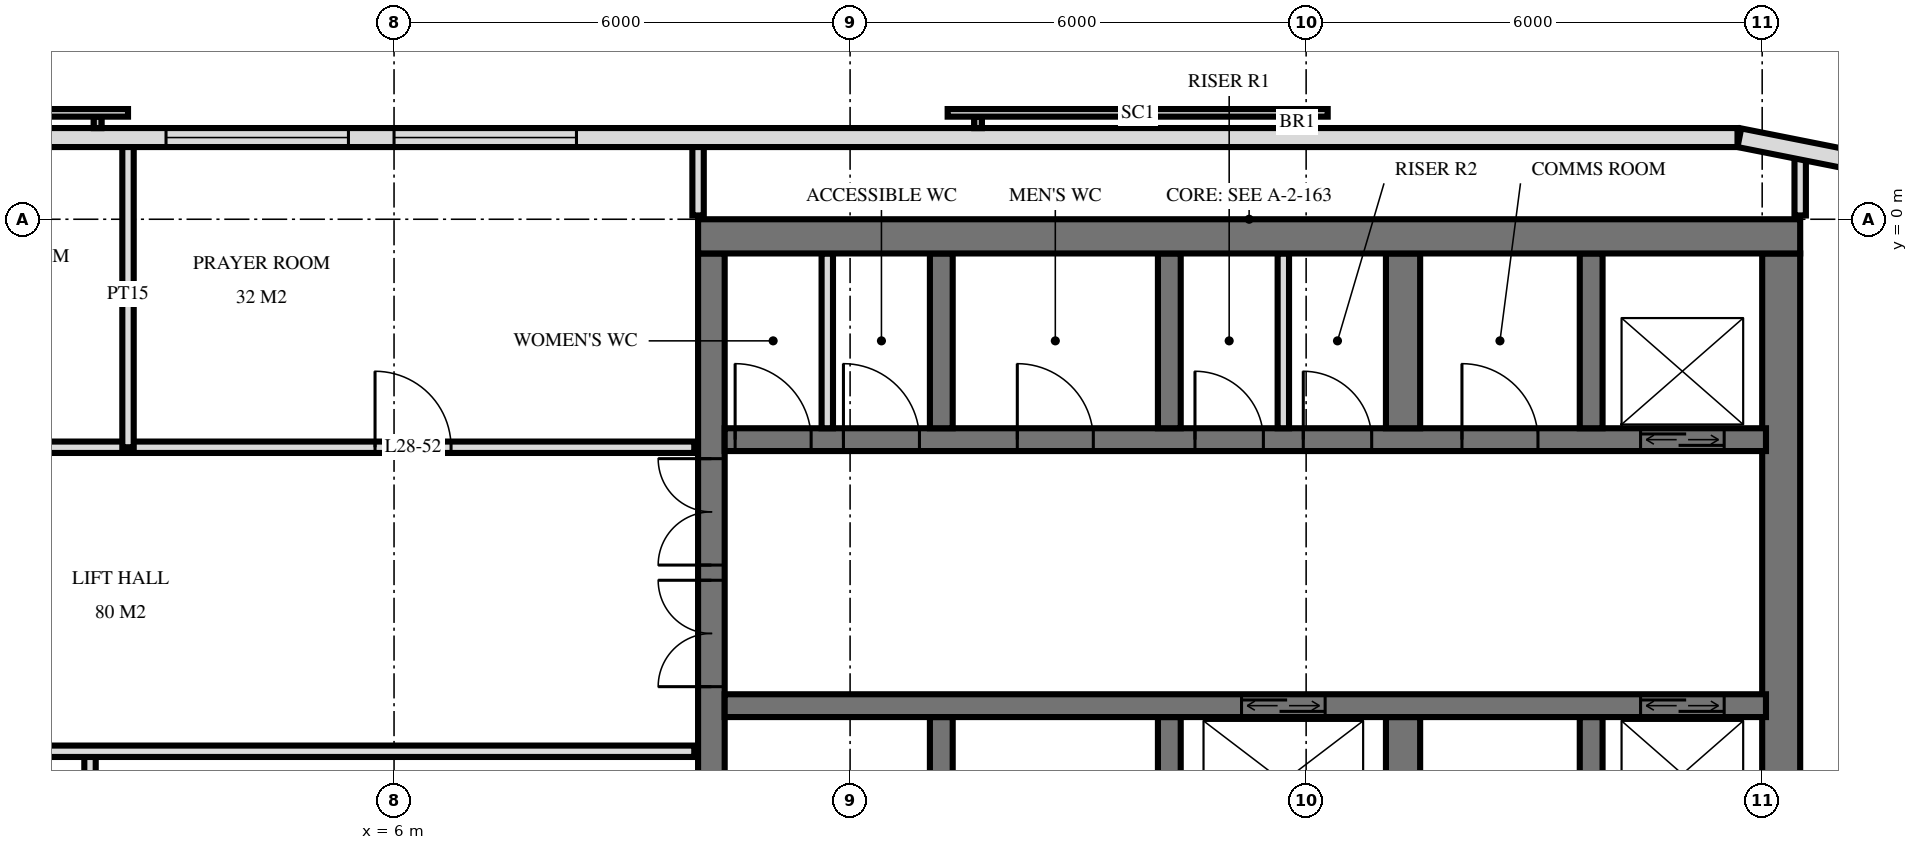
"""IFC4 building model, lengths in metres.
Left out: names, types, materials, properties, quantities, classifications, styles, units other than length and angle.
Written with IfcOpenShell. Run it as: python <this file> out.ifc"""

import sys

from ifc_helpers import new_model, si_unit, direction, frame, frame_2d, origin, place, context, subcontext, project, spatial, rectangle, extrude, element, fill, save


model = new_model("IFC4")
c1 = context("Model", 3, precision=1e-05, world=origin(), true_north=direction((0.0, 1.0)))
c2 = subcontext(c1, "Body", "Model", "MODEL_VIEW")
j1 = project(units=[si_unit("LENGTHUNIT", "METRE"), si_unit("PLANEANGLEUNIT", "RADIAN")], contexts=[c1])
p1 = place(None, origin())
s1 = spatial("IfcSite", under=j1, at=p1, CompositionType="ELEMENT")
p2 = place(p1, origin())
s2 = spatial("IfcBuilding", under=s1, at=p2, CompositionType="ELEMENT")
p3 = place(p2, frame((0.0, 0.0, 112.8)))
s3 = spatial("IfcBuildingStorey", under=s2, at=p3, CompositionType="ELEMENT", Elevation=112.8)
p4 = place(p3, frame((10.0, -0.225, 0.0), z_axis=(0.0, 0.0, 1.0), x_axis=(1.0, 0.0, 0.0)))
e1 = element("IfcWall", 1, at=p4, inside=s3, PredefinedType="SHEAR", context=c2, shape_type="SweptSolid", body=[
    extrude(rectangle(XDim=14.5, YDim=0.45, at=frame_2d((7.25, 0.0))), origin(), (0.0, 0.0, 1.0), 3.6),
])
p5 = place(p3, frame((10.175, -14.55, 0.0), z_axis=(0.0, 0.0, 1.0), x_axis=(0.0, 1.0, 0.0)))
e2 = element("IfcWall", 2, at=p5, inside=s3, PredefinedType="SHEAR", context=c2, shape_type="SweptSolid", body=[
    extrude(rectangle(XDim=14.1, YDim=0.35, at=frame_2d((7.05, 0.0))), origin(), (0.0, 0.0, 1.0), 3.6),
])
p6 = place(p5, frame((8.4, 0.0, 0.0)))
e3 = element("IfcOpeningElement", 3, at=p6, cuts=e2, PredefinedType="OPENING", context=c2, shape_type="SweptSolid", body=[
    extrude(rectangle(XDim=1.4, YDim=2.4, at=frame_2d((0.7, 1.2))), frame((0.0, 0.185, 0.0), z_axis=(0.0, -1.0, 0.0), x_axis=(1.0, 0.0, 0.0)), (0.0, 0.0, 1.0), 0.37),
])
p7 = place(p5, frame((10.0, 0.0, 0.0)))
e4 = element("IfcOpeningElement", 4, at=p7, cuts=e2, PredefinedType="OPENING", context=c2, shape_type="SweptSolid", body=[
    extrude(rectangle(XDim=1.4, YDim=2.4, at=frame_2d((0.7, 1.2))), frame((0.0, 0.185, 0.0), z_axis=(0.0, -1.0, 0.0), x_axis=(1.0, 0.0, 0.0)), (0.0, 0.0, 1.0), 0.37),
])
p8 = place(p5, frame((4.0, 0.0, 0.0)))
e5 = element("IfcOpeningElement", 5, at=p8, cuts=e2, PredefinedType="OPENING", context=c2, shape_type="SweptSolid", body=[
    extrude(rectangle(XDim=1.2, YDim=2.1, at=frame_2d((0.6, 1.05))), frame((0.0, 0.185, 0.0), z_axis=(0.0, -1.0, 0.0), x_axis=(1.0, 0.0, 0.0)), (0.0, 0.0, 1.0), 0.37),
])
p9 = place(p3, frame((24.25, -14.55, 0.0), z_axis=(0.0, 0.0, 1.0), x_axis=(0.0, 1.0, 0.0)))
e6 = element("IfcWall", 6, at=p9, inside=s3, PredefinedType="SHEAR", context=c2, shape_type="SweptSolid", body=[
    extrude(rectangle(XDim=14.1, YDim=0.5, at=frame_2d((7.05, 0.0))), origin(), (0.0, 0.0, 1.0), 3.6),
])
p10 = place(p3, frame((10.35, -2.9, 0.0), z_axis=(0.0, 0.0, 1.0), x_axis=(1.0, 0.0, 0.0)))
e7 = element("IfcWall", 7, at=p10, inside=s3, PredefinedType="SHEAR", context=c2, shape_type="SweptSolid", body=[
    extrude(rectangle(XDim=13.7, YDim=0.3, at=frame_2d((6.85, 0.0))), origin(), (0.0, 0.0, 1.0), 3.6),
])
p11 = place(p10, frame((12.05, 0.0, 0.0)))
e8 = element("IfcOpeningElement", 8, at=p11, cuts=e7, PredefinedType="OPENING", context=c2, shape_type="SweptSolid", body=[
    extrude(rectangle(XDim=1.1, YDim=2.1, at=frame_2d((0.55, 1.05))), frame((0.0, 0.16, 0.0), z_axis=(0.0, -1.0, 0.0), x_axis=(1.0, 0.0, 0.0)), (0.0, 0.0, 1.0), 0.32),
])
p12 = place(p10, frame((6.188, 0.0, 0.0)))
e9 = element("IfcOpeningElement", 9, at=p12, cuts=e7, PredefinedType="OPENING", context=c2, shape_type="SweptSolid", body=[
    extrude(rectangle(XDim=0.9, YDim=2.1, at=frame_2d((0.45, 1.05))), frame((0.0, 0.16, 0.0), z_axis=(0.0, -1.0, 0.0), x_axis=(1.0, 0.0, 0.0)), (0.0, 0.0, 1.0), 0.32),
])
p13 = place(p10, frame((7.613, 0.0, 0.0)))
e10 = element("IfcOpeningElement", 10, at=p13, cuts=e7, PredefinedType="OPENING", context=c2, shape_type="SweptSolid", body=[
    extrude(rectangle(XDim=0.9, YDim=2.1, at=frame_2d((0.45, 1.05))), frame((0.0, 0.16, 0.0), z_axis=(0.0, -1.0, 0.0), x_axis=(1.0, 0.0, 0.0)), (0.0, 0.0, 1.0), 0.32),
])
p14 = place(p10, frame((0.137, 0.0, 0.0)))
e11 = element("IfcOpeningElement", 11, at=p14, cuts=e7, PredefinedType="OPENING", context=c2, shape_type="SweptSolid", body=[
    extrude(rectangle(XDim=1.0, YDim=2.1, at=frame_2d((0.5, 1.05))), frame((0.0, 0.16, 0.0), z_axis=(0.0, -1.0, 0.0), x_axis=(1.0, 0.0, 0.0)), (0.0, 0.0, 1.0), 0.32),
])
p15 = place(p10, frame((1.562, 0.0, 0.0)))
e12 = element("IfcOpeningElement", 12, at=p15, cuts=e7, PredefinedType="OPENING", context=c2, shape_type="SweptSolid", body=[
    extrude(rectangle(XDim=1.0, YDim=2.1, at=frame_2d((0.5, 1.05))), frame((0.0, 0.16, 0.0), z_axis=(0.0, -1.0, 0.0), x_axis=(1.0, 0.0, 0.0)), (0.0, 0.0, 1.0), 0.32),
])
p16 = place(p10, frame((3.85, 0.0, 0.0)))
e13 = element("IfcOpeningElement", 13, at=p16, cuts=e7, PredefinedType="OPENING", context=c2, shape_type="SweptSolid", body=[
    extrude(rectangle(XDim=1.0, YDim=2.1, at=frame_2d((0.5, 1.05))), frame((0.0, 0.16, 0.0), z_axis=(0.0, -1.0, 0.0), x_axis=(1.0, 0.0, 0.0)), (0.0, 0.0, 1.0), 0.32),
])
p17 = place(p10, frame((9.7, 0.0, 0.0)))
e14 = element("IfcOpeningElement", 14, at=p17, cuts=e7, PredefinedType="OPENING", context=c2, shape_type="SweptSolid", body=[
    extrude(rectangle(XDim=1.0, YDim=2.1, at=frame_2d((0.5, 1.05))), frame((0.0, 0.16, 0.0), z_axis=(0.0, -1.0, 0.0), x_axis=(1.0, 0.0, 0.0)), (0.0, 0.0, 1.0), 0.32),
])
p18 = place(p3, frame((10.35, -6.4, 0.0), z_axis=(0.0, 0.0, 1.0), x_axis=(1.0, 0.0, 0.0)))
e15 = element("IfcWall", 15, at=p18, inside=s3, PredefinedType="SHEAR", context=c2, shape_type="SweptSolid", body=[
    extrude(rectangle(XDim=13.7, YDim=0.3, at=frame_2d((6.85, 0.0))), origin(), (0.0, 0.0, 1.0), 3.6),
])
p19 = place(p18, frame((12.05, 0.0, 0.0)))
e16 = element("IfcOpeningElement", 16, at=p19, cuts=e15, PredefinedType="OPENING", context=c2, shape_type="SweptSolid", body=[
    extrude(rectangle(XDim=1.1, YDim=2.1, at=frame_2d((0.55, 1.05))), frame((0.0, 0.16, 0.0), z_axis=(0.0, -1.0, 0.0), x_axis=(1.0, 0.0, 0.0)), (0.0, 0.0, 1.0), 0.32),
])
p20 = place(p18, frame((6.8, 0.0, 0.0)))
e17 = element("IfcOpeningElement", 17, at=p20, cuts=e15, PredefinedType="OPENING", context=c2, shape_type="SweptSolid", body=[
    extrude(rectangle(XDim=1.1, YDim=2.1, at=frame_2d((0.55, 1.05))), frame((0.0, 0.16, 0.0), z_axis=(0.0, -1.0, 0.0), x_axis=(1.0, 0.0, 0.0)), (0.0, 0.0, 1.0), 0.32),
])
for number, where, z_axis, x_axis in (
    (18, (13.2, -2.75, 0.0), (0.0, 0.0, 1.0), (0.0, 1.0, 0.0)),
    (19, (13.2, -8.85, 0.0), (0.0, 0.0, 1.0), (0.0, 1.0, 0.0)),
    (20, (16.2, -2.75, 0.0), (0.0, 0.0, 1.0), (0.0, 1.0, 0.0)),
    (21, (16.2, -8.85, 0.0), (0.0, 0.0, 1.0), (0.0, 1.0, 0.0)),
):
    element("IfcWall", number, at=place(p3, frame(where, z_axis=z_axis, x_axis=x_axis)), inside=s3, PredefinedType="SHEAR", context=c2, shape_type="SweptSolid", body=[
        extrude(rectangle(XDim=2.3, YDim=0.3, at=frame_2d((1.15, 0.0))), origin(), (0.0, 0.0, 1.0), 3.6),
    ])
for number, where, z_axis, x_axis in (
    (22, (19.275, -2.75, 0.0), (0.0, 0.0, 1.0), (0.0, 1.0, 0.0)),
    (23, (19.275, -8.85, 0.0), (0.0, 0.0, 1.0), (0.0, 1.0, 0.0)),
):
    element("IfcWall", number, at=place(p3, frame(where, z_axis=z_axis, x_axis=x_axis)), inside=s3, PredefinedType="SHEAR", context=c2, shape_type="SweptSolid", body=[
        extrude(rectangle(XDim=2.3, YDim=0.45, at=frame_2d((1.15, 0.0))), origin(), (0.0, 0.0, 1.0), 3.6),
    ])
for number, where, z_axis, x_axis in (
    (24, (21.75, -2.75, 0.0), (0.0, 0.0, 1.0), (0.0, 1.0, 0.0)),
    (25, (21.75, -8.85, 0.0), (0.0, 0.0, 1.0), (0.0, 1.0, 0.0)),
):
    element("IfcWall", number, at=place(p3, frame(where, z_axis=z_axis, x_axis=x_axis)), inside=s3, PredefinedType="SHEAR", context=c2, shape_type="SweptSolid", body=[
        extrude(rectangle(XDim=2.3, YDim=0.3, at=frame_2d((1.15, 0.0))), origin(), (0.0, 0.0, 1.0), 3.6),
    ])
p21 = place(p3, frame((25.349, 0.745, 0.0), z_axis=(0.0, 0.0, 1.0), x_axis=(-0.980803419081, 0.194999110559, 0.0)))
e26 = element("IfcWall", 26, at=p21, inside=s3, PredefinedType="SOLIDWALL", context=c2, shape_type="SweptSolid", body=[
    extrude(rectangle(XDim=1.681, YDim=0.25, at=frame_2d((0.841, 0.0))), origin(), (0.0, 0.0, 1.0), 3.32),
])
p22 = place(p3, frame((23.675, 1.075, 0.0), z_axis=(0.0, 0.0, 1.0), x_axis=(-1.0, 0.0, 0.0)))
e27 = element("IfcWall", 27, at=p22, inside=s3, PredefinedType="SOLIDWALL", context=c2, shape_type="SweptSolid", body=[
    extrude(rectangle(XDim=47.351, YDim=0.25, at=frame_2d((23.675, 0.0))), origin(), (0.0, 0.0, 1.0), 3.32),
])
p23 = place(p22, frame((15.275, 0.0, 0.3)))
e28 = element("IfcOpeningElement", 28, at=p23, cuts=e27, PredefinedType="OPENING", context=c2, shape_type="SweptSolid", body=[
    extrude(rectangle(XDim=2.4, YDim=2.1, at=frame_2d((1.2, 1.05))), frame((0.0, 0.135, 0.0), z_axis=(0.0, -1.0, 0.0), x_axis=(1.0, 0.0, 0.0)), (0.0, 0.0, 1.0), 0.27),
])
p24 = place(p22, frame((18.275, 0.0, 0.3)))
e29 = element("IfcOpeningElement", 29, at=p24, cuts=e27, PredefinedType="OPENING", context=c2, shape_type="SweptSolid", body=[
    extrude(rectangle(XDim=2.4, YDim=2.1, at=frame_2d((1.2, 1.05))), frame((0.0, 0.135, 0.0), z_axis=(0.0, -1.0, 0.0), x_axis=(1.0, 0.0, 0.0)), (0.0, 0.0, 1.0), 0.27),
])
p25 = place(p22, frame((24.275, 0.0, 0.3)))
e30 = element("IfcOpeningElement", 30, at=p25, cuts=e27, PredefinedType="OPENING", context=c2, shape_type="SweptSolid", body=[
    extrude(rectangle(XDim=2.4, YDim=2.1, at=frame_2d((1.2, 1.05))), frame((0.0, 0.135, 0.0), z_axis=(0.0, -1.0, 0.0), x_axis=(1.0, 0.0, 0.0)), (0.0, 0.0, 1.0), 0.27),
])
for number, where, z_axis, x_axis in (
    (31, (17.7, -2.75, 0.0), (0.0, 0.0, 1.0), (0.0, 1.0, 0.0)),
    (32, (11.7, -2.75, 0.0), (0.0, 0.0, 1.0), (0.0, 1.0, 0.0)),
):
    element("IfcWall", number, at=place(p3, frame(where, z_axis=z_axis, x_axis=x_axis)), inside=s3, PredefinedType="PARTITIONING", context=c2, shape_type="SweptSolid", body=[
        extrude(rectangle(XDim=2.3, YDim=0.15, at=frame_2d((1.15, 0.0))), origin(), (0.0, 0.0, 1.0), 3.3),
    ])
p26 = place(p3, frame((24.5, 0.05, 0.0), z_axis=(0.0, 0.0, 1.0), x_axis=(0.0, 1.0, 0.0)))
e33 = element("IfcWall", 33, at=p26, inside=s3, PredefinedType="PARTITIONING", context=c2, shape_type="SweptSolid", body=[
    extrude(rectangle(XDim=0.807, YDim=0.15, at=frame_2d((0.404, 0.0))), origin(), (0.0, 0.0, 1.0), 3.32),
])
p27 = place(p3, frame((10.0, 0.05, 0.0), z_axis=(0.0, 0.0, 1.0), x_axis=(0.0, 1.0, 0.0)))
e34 = element("IfcWall", 34, at=p27, inside=s3, PredefinedType="PARTITIONING", context=c2, shape_type="SweptSolid", body=[
    extrude(rectangle(XDim=0.97, YDim=0.15, at=frame_2d((0.485, 0.0))), origin(), (0.0, 0.0, 1.0), 3.32),
])
p28 = place(p3, frame((2.5, -3.0, 0.0), z_axis=(0.0, 0.0, 1.0), x_axis=(0.0, 1.0, 0.0)))
e35 = element("IfcWall", 35, at=p28, inside=s3, PredefinedType="PARTITIONING", context=c2, shape_type="SweptSolid", body=[
    extrude(rectangle(XDim=4.02, YDim=0.15, at=frame_2d((2.01, 0.0))), origin(), (0.0, 0.0, 1.0), 3.32),
])
p29 = place(p3, frame((2.0, -11.0, 0.0), z_axis=(0.0, 0.0, 1.0), x_axis=(0.0, 1.0, 0.0)))
e36 = element("IfcWall", 36, at=p29, inside=s3, PredefinedType="PARTITIONING", context=c2, shape_type="SweptSolid", body=[
    extrude(rectangle(XDim=4.0, YDim=0.15, at=frame_2d((2.0, 0.0))), origin(), (0.0, 0.0, 1.0), 3.32),
])
p30 = place(p3, frame((-9.95, -7.0, 0.0), z_axis=(0.0, 0.0, 1.0), x_axis=(1.0, 0.0, 0.0)))
e37 = element("IfcWall", 37, at=p30, inside=s3, PredefinedType="PARTITIONING", context=c2, shape_type="SweptSolid", body=[
    extrude(rectangle(XDim=19.9, YDim=0.15, at=frame_2d((9.95, 0.0))), origin(), (0.0, 0.0, 1.0), 3.32),
])
p31 = place(p30, frame((9.45, 0.0, 0.0)))
e38 = element("IfcOpeningElement", 38, at=p31, cuts=e37, PredefinedType="OPENING", context=c2, shape_type="SweptSolid", body=[
    extrude(rectangle(XDim=1.0, YDim=2.1, at=frame_2d((0.5, 1.05))), frame((0.0, 0.085, 0.0), z_axis=(0.0, -1.0, 0.0), x_axis=(1.0, 0.0, 0.0)), (0.0, 0.0, 1.0), 0.17),
])
p32 = place(p30, frame((3.45, 0.0, 0.0)))
e39 = element("IfcOpeningElement", 39, at=p32, cuts=e37, PredefinedType="OPENING", context=c2, shape_type="SweptSolid", body=[
    extrude(rectangle(XDim=1.0, YDim=2.1, at=frame_2d((0.5, 1.05))), frame((0.0, 0.085, 0.0), z_axis=(0.0, -1.0, 0.0), x_axis=(1.0, 0.0, 0.0)), (0.0, 0.0, 1.0), 0.17),
])
p33 = place(p3, frame((-9.95, -3.0, 0.0), z_axis=(0.0, 0.0, 1.0), x_axis=(1.0, 0.0, 0.0)))
e40 = element("IfcWall", 40, at=p33, inside=s3, PredefinedType="PARTITIONING", context=c2, shape_type="SweptSolid", body=[
    extrude(rectangle(XDim=19.9, YDim=0.15, at=frame_2d((9.95, 0.0))), origin(), (0.0, 0.0, 1.0), 3.32),
])
p34 = place(p33, frame((0.95, 0.0, 0.0)))
e41 = element("IfcOpeningElement", 41, at=p34, cuts=e40, PredefinedType="OPENING", context=c2, shape_type="SweptSolid", body=[
    extrude(rectangle(XDim=1.0, YDim=2.1, at=frame_2d((0.5, 1.05))), frame((0.0, 0.085, 0.0), z_axis=(0.0, -1.0, 0.0), x_axis=(1.0, 0.0, 0.0)), (0.0, 0.0, 1.0), 0.17),
])
p35 = place(p33, frame((3.7, 0.0, 0.0)))
e42 = element("IfcOpeningElement", 42, at=p35, cuts=e40, PredefinedType="OPENING", context=c2, shape_type="SweptSolid", body=[
    extrude(rectangle(XDim=1.0, YDim=2.1, at=frame_2d((0.5, 1.05))), frame((0.0, 0.085, 0.0), z_axis=(0.0, -1.0, 0.0), x_axis=(1.0, 0.0, 0.0)), (0.0, 0.0, 1.0), 0.17),
])
p36 = place(p33, frame((8.45, 0.0, 0.0)))
e43 = element("IfcOpeningElement", 43, at=p36, cuts=e40, PredefinedType="OPENING", context=c2, shape_type="SweptSolid", body=[
    extrude(rectangle(XDim=1.0, YDim=2.1, at=frame_2d((0.5, 1.05))), frame((0.0, 0.085, 0.0), z_axis=(0.0, -1.0, 0.0), x_axis=(1.0, 0.0, 0.0)), (0.0, 0.0, 1.0), 0.17),
])
p37 = place(p33, frame((15.7, 0.0, 0.0)))
e44 = element("IfcOpeningElement", 44, at=p37, cuts=e40, PredefinedType="OPENING", context=c2, shape_type="SweptSolid", body=[
    extrude(rectangle(XDim=1.0, YDim=2.1, at=frame_2d((0.5, 1.05))), frame((0.0, 0.085, 0.0), z_axis=(0.0, -1.0, 0.0), x_axis=(1.0, 0.0, 0.0)), (0.0, 0.0, 1.0), 0.17),
])
p38 = place(p23, origin())
e45 = element("IfcWindow", 45, at=p38, inside=s3, PartitioningType="SINGLE_PANEL", PredefinedType="WINDOW", context=c2, shape_type="SweptSolid", body=[
    extrude(rectangle(XDim=2.4, YDim=2.1, at=frame_2d((1.2, 1.05))), frame((0.0, 0.03, 0.0), z_axis=(0.0, -1.0, 0.0), x_axis=(1.0, 0.0, 0.0)), (0.0, 0.0, 1.0), 0.06),
])
fill(e28, e45)
p39 = place(p24, origin())
e46 = element("IfcWindow", 46, at=p39, inside=s3, PartitioningType="SINGLE_PANEL", PredefinedType="WINDOW", context=c2, shape_type="SweptSolid", body=[
    extrude(rectangle(XDim=2.4, YDim=2.1, at=frame_2d((1.2, 1.05))), frame((0.0, 0.03, 0.0), z_axis=(0.0, -1.0, 0.0), x_axis=(1.0, 0.0, 0.0)), (0.0, 0.0, 1.0), 0.06),
])
fill(e29, e46)
p40 = place(p11, origin())
e47 = element("IfcDoor", 47, at=p40, inside=s3, OperationType="DOUBLE_DOOR_SLIDING", PredefinedType="USERDEFINED", context=c2, shape_type="SweptSolid", body=[
    extrude(rectangle(XDim=1.1, YDim=2.1, at=frame_2d((0.55, 1.05))), frame((0.0, 0.025, 0.0), z_axis=(0.0, -1.0, 0.0), x_axis=(1.0, 0.0, 0.0)), (0.0, 0.0, 1.0), 0.05),
])
fill(e8, e47)
p41 = place(p19, origin())
e48 = element("IfcDoor", 48, at=p41, inside=s3, OperationType="DOUBLE_DOOR_SLIDING", PredefinedType="USERDEFINED", context=c2, shape_type="SweptSolid", body=[
    extrude(rectangle(XDim=1.1, YDim=2.1, at=frame_2d((0.55, 1.05))), frame((0.0, 0.025, 0.0), z_axis=(0.0, -1.0, 0.0), x_axis=(1.0, 0.0, 0.0)), (0.0, 0.0, 1.0), 0.05),
])
fill(e16, e48)
p42 = place(p20, origin())
e49 = element("IfcDoor", 49, at=p42, inside=s3, OperationType="DOUBLE_DOOR_SLIDING", PredefinedType="USERDEFINED", context=c2, shape_type="SweptSolid", body=[
    extrude(rectangle(XDim=1.1, YDim=2.1, at=frame_2d((0.55, 1.05))), frame((0.0, 0.025, 0.0), z_axis=(0.0, -1.0, 0.0), x_axis=(1.0, 0.0, 0.0)), (0.0, 0.0, 1.0), 0.05),
])
fill(e17, e49)
p43 = place(p6, origin())
e50 = element("IfcDoor", 50, at=p43, inside=s3, OperationType="DOUBLE_DOOR_SINGLE_SWING", PredefinedType="DOOR", context=c2, shape_type="SweptSolid", body=[
    extrude(rectangle(XDim=1.4, YDim=2.4, at=frame_2d((0.7, 1.2))), frame((0.0, 0.025, 0.0), z_axis=(0.0, -1.0, 0.0), x_axis=(1.0, 0.0, 0.0)), (0.0, 0.0, 1.0), 0.05),
])
fill(e3, e50)
p44 = place(p7, origin())
e51 = element("IfcDoor", 51, at=p44, inside=s3, OperationType="DOUBLE_DOOR_SINGLE_SWING", PredefinedType="DOOR", context=c2, shape_type="SweptSolid", body=[
    extrude(rectangle(XDim=1.4, YDim=2.4, at=frame_2d((0.7, 1.2))), frame((0.0, 0.025, 0.0), z_axis=(0.0, -1.0, 0.0), x_axis=(1.0, 0.0, 0.0)), (0.0, 0.0, 1.0), 0.05),
])
fill(e4, e51)
p45 = place(p12, origin())
e52 = element("IfcDoor", 52, at=p45, inside=s3, OperationType="SINGLE_SWING_RIGHT", PredefinedType="DOOR", context=c2, shape_type="SweptSolid", body=[
    extrude(rectangle(XDim=0.9, YDim=2.1, at=frame_2d((0.45, 1.05))), frame((0.0, 0.025, 0.0), z_axis=(0.0, -1.0, 0.0), x_axis=(1.0, 0.0, 0.0)), (0.0, 0.0, 1.0), 0.05),
])
fill(e9, e52)
p46 = place(p13, origin())
e53 = element("IfcDoor", 53, at=p46, inside=s3, OperationType="SINGLE_SWING_RIGHT", PredefinedType="DOOR", context=c2, shape_type="SweptSolid", body=[
    extrude(rectangle(XDim=0.9, YDim=2.1, at=frame_2d((0.45, 1.05))), frame((0.0, 0.025, 0.0), z_axis=(0.0, -1.0, 0.0), x_axis=(1.0, 0.0, 0.0)), (0.0, 0.0, 1.0), 0.05),
])
fill(e10, e53)
p47 = place(p14, origin())
e54 = element("IfcDoor", 54, at=p47, inside=s3, OperationType="SINGLE_SWING_RIGHT", PredefinedType="DOOR", context=c2, shape_type="SweptSolid", body=[
    extrude(rectangle(XDim=1.0, YDim=2.1, at=frame_2d((0.5, 1.05))), frame((0.0, 0.025, 0.0), z_axis=(0.0, -1.0, 0.0), x_axis=(1.0, 0.0, 0.0)), (0.0, 0.0, 1.0), 0.05),
])
fill(e11, e54)
p48 = place(p15, origin())
e55 = element("IfcDoor", 55, at=p48, inside=s3, OperationType="SINGLE_SWING_RIGHT", PredefinedType="DOOR", context=c2, shape_type="SweptSolid", body=[
    extrude(rectangle(XDim=1.0, YDim=2.1, at=frame_2d((0.5, 1.05))), frame((0.0, 0.025, 0.0), z_axis=(0.0, -1.0, 0.0), x_axis=(1.0, 0.0, 0.0)), (0.0, 0.0, 1.0), 0.05),
])
fill(e12, e55)
p49 = place(p16, origin())
e56 = element("IfcDoor", 56, at=p49, inside=s3, OperationType="SINGLE_SWING_RIGHT", PredefinedType="DOOR", context=c2, shape_type="SweptSolid", body=[
    extrude(rectangle(XDim=1.0, YDim=2.1, at=frame_2d((0.5, 1.05))), frame((0.0, 0.025, 0.0), z_axis=(0.0, -1.0, 0.0), x_axis=(1.0, 0.0, 0.0)), (0.0, 0.0, 1.0), 0.05),
])
fill(e13, e56)
p50 = place(p17, origin())
e57 = element("IfcDoor", 57, at=p50, inside=s3, OperationType="SINGLE_SWING_RIGHT", PredefinedType="DOOR", context=c2, shape_type="SweptSolid", body=[
    extrude(rectangle(XDim=1.0, YDim=2.1, at=frame_2d((0.5, 1.05))), frame((0.0, 0.025, 0.0), z_axis=(0.0, -1.0, 0.0), x_axis=(1.0, 0.0, 0.0)), (0.0, 0.0, 1.0), 0.05),
])
fill(e14, e57)
p51 = place(p37, origin())
e58 = element("IfcDoor", 58, at=p51, inside=s3, OperationType="SINGLE_SWING_RIGHT", PredefinedType="DOOR", context=c2, shape_type="SweptSolid", body=[
    extrude(rectangle(XDim=1.0, YDim=2.1, at=frame_2d((0.5, 1.05))), frame((0.0, 0.025, 0.0), z_axis=(0.0, -1.0, 0.0), x_axis=(1.0, 0.0, 0.0)), (0.0, 0.0, 1.0), 0.05),
])
fill(e44, e58)
save(model, sys.argv[1])
